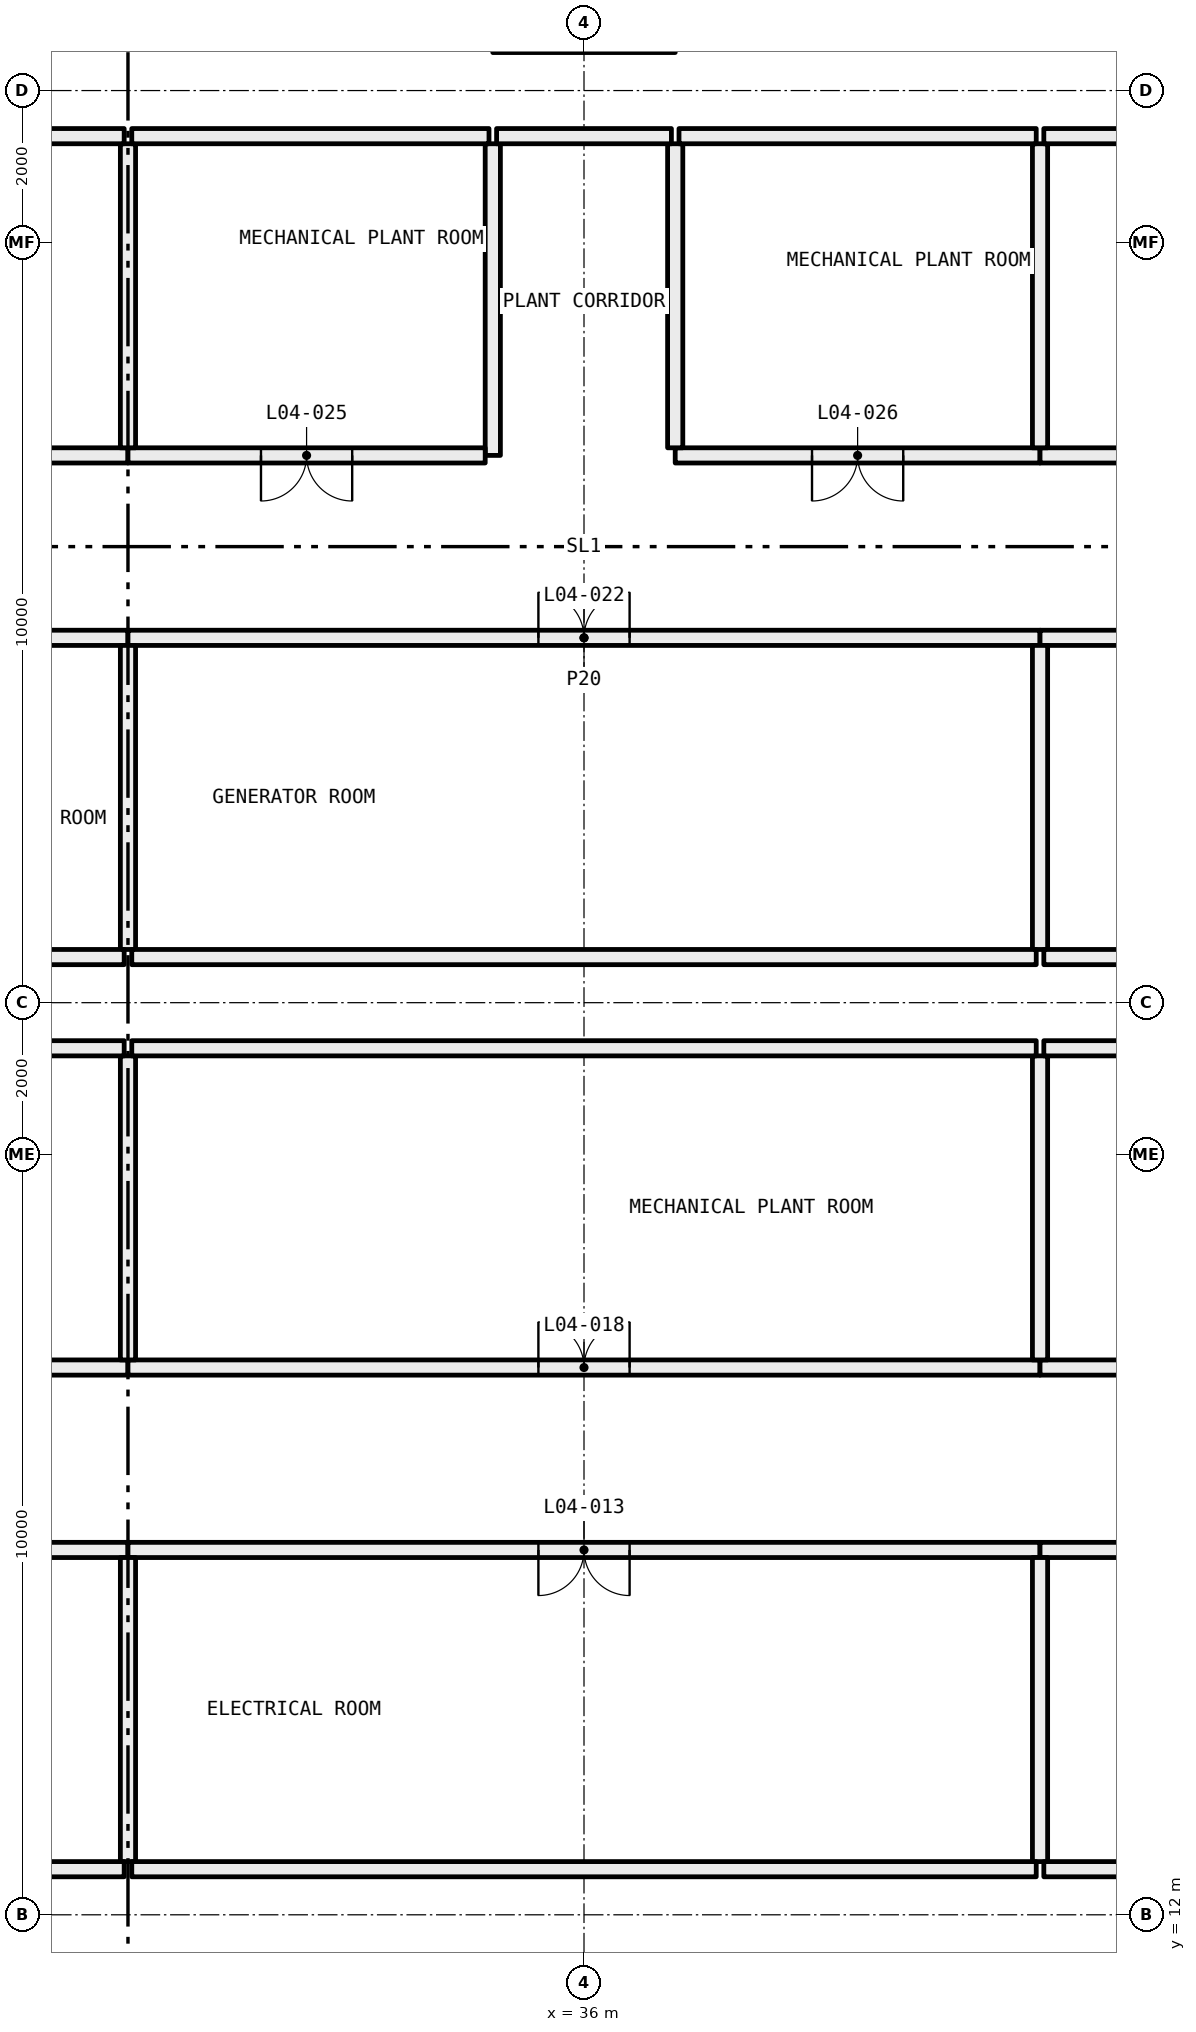
"""IFC4 building model, lengths in metres.
Left out: names, types, materials, properties, quantities, classifications, styles, units other than length and angle.
Written with IfcOpenShell. Run it as: python <this file> out.ifc"""

import sys

from ifc_helpers import new_model, si_unit, direction, frame, frame_2d, origin, place, context, subcontext, project, spatial, rectangle, extrude, element, fill, save


model = new_model("IFC4")
c1 = context("Model", 3, precision=1e-05, world=origin(), true_north=direction((0.0, 1.0)))
c2 = subcontext(c1, "Body", "Model", "MODEL_VIEW")
j1 = project(units=[si_unit("LENGTHUNIT", "METRE"), si_unit("PLANEANGLEUNIT", "RADIAN")], contexts=[c1])
p1 = place(None, origin())
s1 = spatial("IfcSite", under=j1, at=p1, CompositionType="ELEMENT")
p2 = place(p1, origin())
s2 = spatial("IfcBuilding", under=s1, at=p2, CompositionType="ELEMENT")
p3 = place(p2, frame((0.0, 0.0, 24.0)))
s3 = spatial("IfcBuildingStorey", under=s2, at=p3, CompositionType="ELEMENT", Elevation=24.0)
p4 = place(p3, frame((30.0, 16.8, 0.0), z_axis=(0.0, 0.0, 1.0), x_axis=(-1.0, 0.0, 0.0)))
e1 = element("IfcWall", 1, at=p4, inside=s3, PredefinedType="PARTITIONING", context=c2, shape_type="SweptSolid", body=[
    extrude(rectangle(XDim=12.0, YDim=0.2, at=frame_2d((6.0, 0.0))), origin(), (0.0, 0.0, 1.0), 5.6),
])
p5 = place(p4, frame((5.4, 0.0, 0.0)))
e2 = element("IfcOpeningElement", 2, at=p5, cuts=e1, PredefinedType="OPENING", context=c2, shape_type="SweptSolid", body=[
    extrude(rectangle(XDim=1.2, YDim=2.1, at=frame_2d((0.6, 1.05))), frame((0.0, 0.11, 0.0), z_axis=(0.0, -1.0, 0.0), x_axis=(1.0, 0.0, 0.0)), (0.0, 0.0, 1.0), 0.22),
])
p6 = place(p3, frame((42.0, 16.8, 0.0), z_axis=(0.0, 0.0, 1.0), x_axis=(-1.0, 0.0, 0.0)))
e3 = element("IfcWall", 3, at=p6, inside=s3, PredefinedType="PARTITIONING", context=c2, shape_type="SweptSolid", body=[
    extrude(rectangle(XDim=12.0, YDim=0.2, at=frame_2d((6.0, 0.0))), origin(), (0.0, 0.0, 1.0), 5.6),
])
p7 = place(p6, frame((5.4, 0.0, 0.0)))
e4 = element("IfcOpeningElement", 4, at=p7, cuts=e3, PredefinedType="OPENING", context=c2, shape_type="SweptSolid", body=[
    extrude(rectangle(XDim=1.2, YDim=2.1, at=frame_2d((0.6, 1.05))), frame((0.0, 0.11, 0.0), z_axis=(0.0, -1.0, 0.0), x_axis=(1.0, 0.0, 0.0)), (0.0, 0.0, 1.0), 0.22),
])
p8 = place(p3, frame((54.0, 16.8, 0.0), z_axis=(0.0, 0.0, 1.0), x_axis=(-1.0, 0.0, 0.0)))
e5 = element("IfcWall", 5, at=p8, inside=s3, PredefinedType="PARTITIONING", context=c2, shape_type="SweptSolid", body=[
    extrude(rectangle(XDim=12.0, YDim=0.2, at=frame_2d((6.0, 0.0))), origin(), (0.0, 0.0, 1.0), 5.6),
])
p9 = place(p8, frame((5.4, 0.0, 0.0)))
e6 = element("IfcOpeningElement", 6, at=p9, cuts=e5, PredefinedType="OPENING", context=c2, shape_type="SweptSolid", body=[
    extrude(rectangle(XDim=1.2, YDim=2.1, at=frame_2d((0.6, 1.05))), frame((0.0, 0.11, 0.0), z_axis=(0.0, -1.0, 0.0), x_axis=(1.0, 0.0, 0.0)), (0.0, 0.0, 1.0), 0.22),
])
p10 = place(p3, frame((18.0, 19.2, 0.0), z_axis=(0.0, 0.0, 1.0), x_axis=(1.0, 0.0, 0.0)))
e7 = element("IfcWall", 7, at=p10, inside=s3, PredefinedType="PARTITIONING", context=c2, shape_type="SweptSolid", body=[
    extrude(rectangle(XDim=12.0, YDim=0.2, at=frame_2d((6.0, 0.0))), origin(), (0.0, 0.0, 1.0), 5.6),
])
p11 = place(p10, frame((5.4, 0.0, 0.0)))
e8 = element("IfcOpeningElement", 8, at=p11, cuts=e7, PredefinedType="OPENING", context=c2, shape_type="SweptSolid", body=[
    extrude(rectangle(XDim=1.2, YDim=2.1, at=frame_2d((0.6, 1.05))), frame((0.0, 0.11, 0.0), z_axis=(0.0, -1.0, 0.0), x_axis=(1.0, 0.0, 0.0)), (0.0, 0.0, 1.0), 0.22),
])
p12 = place(p3, frame((30.0, 19.2, 0.0), z_axis=(0.0, 0.0, 1.0), x_axis=(1.0, 0.0, 0.0)))
e9 = element("IfcWall", 9, at=p12, inside=s3, PredefinedType="PARTITIONING", context=c2, shape_type="SweptSolid", body=[
    extrude(rectangle(XDim=12.0, YDim=0.2, at=frame_2d((6.0, 0.0))), origin(), (0.0, 0.0, 1.0), 5.6),
])
p13 = place(p12, frame((5.4, 0.0, 0.0)))
e10 = element("IfcOpeningElement", 10, at=p13, cuts=e9, PredefinedType="OPENING", context=c2, shape_type="SweptSolid", body=[
    extrude(rectangle(XDim=1.2, YDim=2.1, at=frame_2d((0.6, 1.05))), frame((0.0, 0.11, 0.0), z_axis=(0.0, -1.0, 0.0), x_axis=(1.0, 0.0, 0.0)), (0.0, 0.0, 1.0), 0.22),
])
p14 = place(p3, frame((42.0, 19.2, 0.0), z_axis=(0.0, 0.0, 1.0), x_axis=(1.0, 0.0, 0.0)))
e11 = element("IfcWall", 11, at=p14, inside=s3, PredefinedType="PARTITIONING", context=c2, shape_type="SweptSolid", body=[
    extrude(rectangle(XDim=12.0, YDim=0.2, at=frame_2d((6.0, 0.0))), origin(), (0.0, 0.0, 1.0), 5.6),
])
p15 = place(p14, frame((5.4, 0.0, 0.0)))
e12 = element("IfcOpeningElement", 12, at=p15, cuts=e11, PredefinedType="OPENING", context=c2, shape_type="SweptSolid", body=[
    extrude(rectangle(XDim=1.2, YDim=2.1, at=frame_2d((0.6, 1.05))), frame((0.0, 0.11, 0.0), z_axis=(0.0, -1.0, 0.0), x_axis=(1.0, 0.0, 0.0)), (0.0, 0.0, 1.0), 0.22),
])
p16 = place(p3, frame((23.5, 28.8, 0.0), z_axis=(0.0, 0.0, 1.0), x_axis=(1.0, 0.0, 0.0)))
e13 = element("IfcWall", 13, at=p16, inside=s3, PredefinedType="PARTITIONING", context=c2, shape_type="SweptSolid", body=[
    extrude(rectangle(XDim=6.5, YDim=0.2, at=frame_2d((3.25, 0.0))), origin(), (0.0, 0.0, 1.0), 5.6),
])
p17 = place(p16, frame((2.65, 0.0, 0.0)))
e14 = element("IfcOpeningElement", 14, at=p17, cuts=e13, PredefinedType="OPENING", context=c2, shape_type="SweptSolid", body=[
    extrude(rectangle(XDim=1.2, YDim=2.1, at=frame_2d((0.6, 1.05))), frame((0.0, 0.11, 0.0), z_axis=(0.0, -1.0, 0.0), x_axis=(1.0, 0.0, 0.0)), (0.0, 0.0, 1.0), 0.22),
])
p18 = place(p3, frame((30.0, 28.8, 0.0), z_axis=(0.0, 0.0, 1.0), x_axis=(1.0, 0.0, 0.0)))
e15 = element("IfcWall", 15, at=p18, inside=s3, PredefinedType="PARTITIONING", context=c2, shape_type="SweptSolid", body=[
    extrude(rectangle(XDim=12.0, YDim=0.2, at=frame_2d((6.0, 0.0))), origin(), (0.0, 0.0, 1.0), 5.6),
])
p19 = place(p18, frame((5.4, 0.0, 0.0)))
e16 = element("IfcOpeningElement", 16, at=p19, cuts=e15, PredefinedType="OPENING", context=c2, shape_type="SweptSolid", body=[
    extrude(rectangle(XDim=1.2, YDim=2.1, at=frame_2d((0.6, 1.05))), frame((0.0, 0.11, 0.0), z_axis=(0.0, -1.0, 0.0), x_axis=(1.0, 0.0, 0.0)), (0.0, 0.0, 1.0), 0.22),
])
p20 = place(p3, frame((42.0, 28.8, 0.0), z_axis=(0.0, 0.0, 1.0), x_axis=(1.0, 0.0, 0.0)))
e17 = element("IfcWall", 17, at=p20, inside=s3, PredefinedType="PARTITIONING", context=c2, shape_type="SweptSolid", body=[
    extrude(rectangle(XDim=6.5, YDim=0.2, at=frame_2d((3.25, 0.0))), origin(), (0.0, 0.0, 1.0), 5.6),
])
p21 = place(p20, frame((2.65, 0.0, 0.0)))
e18 = element("IfcOpeningElement", 18, at=p21, cuts=e17, PredefinedType="OPENING", context=c2, shape_type="SweptSolid", body=[
    extrude(rectangle(XDim=1.2, YDim=2.1, at=frame_2d((0.6, 1.05))), frame((0.0, 0.11, 0.0), z_axis=(0.0, -1.0, 0.0), x_axis=(1.0, 0.0, 0.0)), (0.0, 0.0, 1.0), 0.22),
])
p22 = place(p3, frame((30.0, 31.2, 0.0), z_axis=(0.0, 0.0, 1.0), x_axis=(-1.0, 0.0, 0.0)))
e19 = element("IfcWall", 19, at=p22, inside=s3, PredefinedType="PARTITIONING", context=c2, shape_type="SweptSolid", body=[
    extrude(rectangle(XDim=6.5, YDim=0.2, at=frame_2d((3.25, 0.0))), origin(), (0.0, 0.0, 1.0), 5.6),
])
p23 = place(p22, frame((2.65, 0.0, 0.0)))
e20 = element("IfcOpeningElement", 20, at=p23, cuts=e19, PredefinedType="OPENING", context=c2, shape_type="SweptSolid", body=[
    extrude(rectangle(XDim=1.2, YDim=2.1, at=frame_2d((0.6, 1.05))), frame((0.0, 0.11, 0.0), z_axis=(0.0, -1.0, 0.0), x_axis=(1.0, 0.0, 0.0)), (0.0, 0.0, 1.0), 0.22),
])
p24 = place(p3, frame((34.8, 35.3, 0.0), z_axis=(0.0, 0.0, 1.0), x_axis=(0.0, -1.0, 0.0)))
e21 = element("IfcWall", 21, at=p24, inside=s3, PredefinedType="PARTITIONING", context=c2, shape_type="SweptSolid", body=[
    extrude(rectangle(XDim=4.1, YDim=0.2, at=frame_2d((2.05, 0.0))), origin(), (0.0, 0.0, 1.0), 5.6),
])
p25 = place(p3, frame((34.7, 31.2, 0.0), z_axis=(0.0, 0.0, 1.0), x_axis=(-1.0, 0.0, 0.0)))
e22 = element("IfcWall", 22, at=p25, inside=s3, PredefinedType="PARTITIONING", context=c2, shape_type="SweptSolid", body=[
    extrude(rectangle(XDim=4.7, YDim=0.2, at=frame_2d((2.35, 0.0))), origin(), (0.0, 0.0, 1.0), 5.6),
])
p26 = place(p25, frame((1.75, 0.0, 0.0)))
e23 = element("IfcOpeningElement", 23, at=p26, cuts=e22, PredefinedType="OPENING", context=c2, shape_type="SweptSolid", body=[
    extrude(rectangle(XDim=1.2, YDim=2.1, at=frame_2d((0.6, 1.05))), frame((0.0, 0.11, 0.0), z_axis=(0.0, -1.0, 0.0), x_axis=(1.0, 0.0, 0.0)), (0.0, 0.0, 1.0), 0.22),
])
p27 = place(p3, frame((42.0, 31.2, 0.0), z_axis=(0.0, 0.0, 1.0), x_axis=(-1.0, 0.0, 0.0)))
e24 = element("IfcWall", 24, at=p27, inside=s3, PredefinedType="PARTITIONING", context=c2, shape_type="SweptSolid", body=[
    extrude(rectangle(XDim=4.8, YDim=0.2, at=frame_2d((2.4, 0.0))), origin(), (0.0, 0.0, 1.0), 5.6),
])
p28 = place(p27, frame((1.8, 0.0, 0.0)))
e25 = element("IfcOpeningElement", 25, at=p28, cuts=e24, PredefinedType="OPENING", context=c2, shape_type="SweptSolid", body=[
    extrude(rectangle(XDim=1.2, YDim=2.1, at=frame_2d((0.6, 1.05))), frame((0.0, 0.11, 0.0), z_axis=(0.0, -1.0, 0.0), x_axis=(1.0, 0.0, 0.0)), (0.0, 0.0, 1.0), 0.22),
])
p29 = place(p3, frame((37.2, 31.3, 0.0), z_axis=(0.0, 0.0, 1.0), x_axis=(0.0, 1.0, 0.0)))
e26 = element("IfcWall", 26, at=p29, inside=s3, PredefinedType="PARTITIONING", context=c2, shape_type="SweptSolid", body=[
    extrude(rectangle(XDim=4.0, YDim=0.2, at=frame_2d((2.0, 0.0))), origin(), (0.0, 0.0, 1.0), 5.6),
])
p30 = place(p3, frame((48.5, 31.2, 0.0), z_axis=(0.0, 0.0, 1.0), x_axis=(-1.0, 0.0, 0.0)))
e27 = element("IfcWall", 27, at=p30, inside=s3, PredefinedType="PARTITIONING", context=c2, shape_type="SweptSolid", body=[
    extrude(rectangle(XDim=6.5, YDim=0.2, at=frame_2d((3.25, 0.0))), origin(), (0.0, 0.0, 1.0), 5.6),
])
p31 = place(p30, frame((2.65, 0.0, 0.0)))
e28 = element("IfcOpeningElement", 28, at=p31, cuts=e27, PredefinedType="OPENING", context=c2, shape_type="SweptSolid", body=[
    extrude(rectangle(XDim=1.2, YDim=2.1, at=frame_2d((0.6, 1.05))), frame((0.0, 0.11, 0.0), z_axis=(0.0, -1.0, 0.0), x_axis=(1.0, 0.0, 0.0)), (0.0, 0.0, 1.0), 0.22),
])
for number, where, z_axis, x_axis in (
    (29, (30.0, 12.7, 0.0), (0.0, 0.0, 1.0), (0.0, 1.0, 0.0)),
    (30, (42.0, 12.7, 0.0), (0.0, 0.0, 1.0), (0.0, 1.0, 0.0)),
    (31, (30.0, 19.3, 0.0), (0.0, 0.0, 1.0), (0.0, 1.0, 0.0)),
    (32, (42.0, 19.3, 0.0), (0.0, 0.0, 1.0), (0.0, 1.0, 0.0)),
    (33, (30.0, 24.7, 0.0), (0.0, 0.0, 1.0), (0.0, 1.0, 0.0)),
    (34, (42.0, 24.7, 0.0), (0.0, 0.0, 1.0), (0.0, 1.0, 0.0)),
    (35, (30.0, 31.3, 0.0), (0.0, 0.0, 1.0), (0.0, 1.0, 0.0)),
    (36, (42.0, 31.3, 0.0), (0.0, 0.0, 1.0), (0.0, 1.0, 0.0)),
):
    element("IfcWall", number, at=place(p3, frame(where, z_axis=z_axis, x_axis=x_axis)), inside=s3, PredefinedType="PARTITIONING", context=c2, shape_type="SweptSolid", body=[
        extrude(rectangle(XDim=4.0, YDim=0.2, at=frame_2d((2.0, 0.0))), origin(), (0.0, 0.0, 1.0), 5.6),
    ])
p32 = place(p3, frame((37.15, 35.4, 0.0), z_axis=(0.0, 0.0, 1.0), x_axis=(-1.0, 0.0, 0.0)))
e37 = element("IfcWall", 37, at=p32, inside=s3, PredefinedType="PARTITIONING", context=c2, shape_type="SweptSolid", body=[
    extrude(rectangle(XDim=2.3, YDim=0.2, at=frame_2d((1.15, 0.0))), origin(), (0.0, 0.0, 1.0), 5.6),
])
p33 = place(p3, frame((24.55, 12.6, 0.0), z_axis=(0.0, 0.0, 1.0), x_axis=(1.0, 0.0, 0.0)))
e38 = element("IfcWall", 38, at=p33, inside=s3, PredefinedType="PARTITIONING", context=c2, shape_type="SweptSolid", body=[
    extrude(rectangle(XDim=5.4, YDim=0.2, at=frame_2d((2.7, 0.0))), origin(), (0.0, 0.0, 1.0), 5.6),
])
p34 = place(p3, frame((30.05, 12.6, 0.0), z_axis=(0.0, 0.0, 1.0), x_axis=(1.0, 0.0, 0.0)))
e39 = element("IfcWall", 39, at=p34, inside=s3, PredefinedType="PARTITIONING", context=c2, shape_type="SweptSolid", body=[
    extrude(rectangle(XDim=11.9, YDim=0.2, at=frame_2d((5.95, 0.0))), origin(), (0.0, 0.0, 1.0), 5.6),
])
p35 = place(p3, frame((42.05, 12.6, 0.0), z_axis=(0.0, 0.0, 1.0), x_axis=(1.0, 0.0, 0.0)))
e40 = element("IfcWall", 40, at=p35, inside=s3, PredefinedType="PARTITIONING", context=c2, shape_type="SweptSolid", body=[
    extrude(rectangle(XDim=5.2, YDim=0.2, at=frame_2d((2.6, 0.0))), origin(), (0.0, 0.0, 1.0), 5.6),
])
p36 = place(p3, frame((29.95, 23.4, 0.0), z_axis=(0.0, 0.0, 1.0), x_axis=(-1.0, 0.0, 0.0)))
e41 = element("IfcWall", 41, at=p36, inside=s3, PredefinedType="PARTITIONING", context=c2, shape_type="SweptSolid", body=[
    extrude(rectangle(XDim=6.0, YDim=0.2, at=frame_2d((3.0, 0.0))), origin(), (0.0, 0.0, 1.0), 5.6),
])
p37 = place(p3, frame((41.95, 23.4, 0.0), z_axis=(0.0, 0.0, 1.0), x_axis=(-1.0, 0.0, 0.0)))
e42 = element("IfcWall", 42, at=p37, inside=s3, PredefinedType="PARTITIONING", context=c2, shape_type="SweptSolid", body=[
    extrude(rectangle(XDim=11.9, YDim=0.2, at=frame_2d((5.95, 0.0))), origin(), (0.0, 0.0, 1.0), 5.6),
])
for number, where, z_axis, x_axis in (
    (43, (48.05, 23.4, 0.0), (0.0, 0.0, 1.0), (-1.0, 0.0, 0.0)),
    (44, (23.95, 24.6, 0.0), (0.0, 0.0, 1.0), (1.0, 0.0, 0.0)),
):
    element("IfcWall", number, at=place(p3, frame(where, z_axis=z_axis, x_axis=x_axis)), inside=s3, PredefinedType="PARTITIONING", context=c2, shape_type="SweptSolid", body=[
        extrude(rectangle(XDim=6.0, YDim=0.2, at=frame_2d((3.0, 0.0))), origin(), (0.0, 0.0, 1.0), 5.6),
    ])
p38 = place(p3, frame((30.05, 24.6, 0.0), z_axis=(0.0, 0.0, 1.0), x_axis=(1.0, 0.0, 0.0)))
e45 = element("IfcWall", 45, at=p38, inside=s3, PredefinedType="PARTITIONING", context=c2, shape_type="SweptSolid", body=[
    extrude(rectangle(XDim=11.9, YDim=0.2, at=frame_2d((5.95, 0.0))), origin(), (0.0, 0.0, 1.0), 5.6),
])
for number, where, z_axis, x_axis in (
    (46, (42.05, 24.6, 0.0), (0.0, 0.0, 1.0), (1.0, 0.0, 0.0)),
    (47, (29.95, 35.4, 0.0), (0.0, 0.0, 1.0), (-1.0, 0.0, 0.0)),
):
    element("IfcWall", number, at=place(p3, frame(where, z_axis=z_axis, x_axis=x_axis)), inside=s3, PredefinedType="PARTITIONING", context=c2, shape_type="SweptSolid", body=[
        extrude(rectangle(XDim=6.0, YDim=0.2, at=frame_2d((3.0, 0.0))), origin(), (0.0, 0.0, 1.0), 5.6),
    ])
for number, where, z_axis, x_axis in (
    (48, (34.75, 35.4, 0.0), (0.0, 0.0, 1.0), (-1.0, 0.0, 0.0)),
    (49, (41.95, 35.4, 0.0), (0.0, 0.0, 1.0), (-1.0, 0.0, 0.0)),
):
    element("IfcWall", number, at=place(p3, frame(where, z_axis=z_axis, x_axis=x_axis)), inside=s3, PredefinedType="PARTITIONING", context=c2, shape_type="SweptSolid", body=[
        extrude(rectangle(XDim=4.7, YDim=0.2, at=frame_2d((2.35, 0.0))), origin(), (0.0, 0.0, 1.0), 5.6),
    ])
p39 = place(p3, frame((48.05, 35.4, 0.0), z_axis=(0.0, 0.0, 1.0), x_axis=(-1.0, 0.0, 0.0)))
e50 = element("IfcWall", 50, at=p39, inside=s3, PredefinedType="PARTITIONING", context=c2, shape_type="SweptSolid", body=[
    extrude(rectangle(XDim=6.0, YDim=0.2, at=frame_2d((3.0, 0.0))), origin(), (0.0, 0.0, 1.0), 5.6),
])
p40 = place(p7, origin())
e51 = element("IfcDoor", 51, at=p40, inside=s3, OperationType="DOUBLE_DOOR_SINGLE_SWING", PredefinedType="DOOR", context=c2, shape_type="SweptSolid", body=[
    extrude(rectangle(XDim=1.2, YDim=2.1, at=frame_2d((0.6, 1.05))), frame((0.0, 0.025, 0.0), z_axis=(0.0, -1.0, 0.0), x_axis=(1.0, 0.0, 0.0)), (0.0, 0.0, 1.0), 0.05),
])
fill(e4, e51)
p41 = place(p13, origin())
e52 = element("IfcDoor", 52, at=p41, inside=s3, OperationType="DOUBLE_DOOR_SINGLE_SWING", PredefinedType="DOOR", context=c2, shape_type="SweptSolid", body=[
    extrude(rectangle(XDim=1.2, YDim=2.1, at=frame_2d((0.6, 1.05))), frame((0.0, 0.025, 0.0), z_axis=(0.0, -1.0, 0.0), x_axis=(1.0, 0.0, 0.0)), (0.0, 0.0, 1.0), 0.05),
])
fill(e10, e52)
p42 = place(p19, origin())
e53 = element("IfcDoor", 53, at=p42, inside=s3, OperationType="DOUBLE_DOOR_SINGLE_SWING", PredefinedType="DOOR", context=c2, shape_type="SweptSolid", body=[
    extrude(rectangle(XDim=1.2, YDim=2.1, at=frame_2d((0.6, 1.05))), frame((0.0, 0.025, 0.0), z_axis=(0.0, -1.0, 0.0), x_axis=(1.0, 0.0, 0.0)), (0.0, 0.0, 1.0), 0.05),
])
fill(e16, e53)
p43 = place(p26, origin())
e54 = element("IfcDoor", 54, at=p43, inside=s3, OperationType="DOUBLE_DOOR_SINGLE_SWING", PredefinedType="DOOR", context=c2, shape_type="SweptSolid", body=[
    extrude(rectangle(XDim=1.2, YDim=2.1, at=frame_2d((0.6, 1.05))), frame((0.0, 0.025, 0.0), z_axis=(0.0, -1.0, 0.0), x_axis=(1.0, 0.0, 0.0)), (0.0, 0.0, 1.0), 0.05),
])
fill(e23, e54)
p44 = place(p28, origin())
e55 = element("IfcDoor", 55, at=p44, inside=s3, OperationType="DOUBLE_DOOR_SINGLE_SWING", PredefinedType="DOOR", context=c2, shape_type="SweptSolid", body=[
    extrude(rectangle(XDim=1.2, YDim=2.1, at=frame_2d((0.6, 1.05))), frame((0.0, 0.025, 0.0), z_axis=(0.0, -1.0, 0.0), x_axis=(1.0, 0.0, 0.0)), (0.0, 0.0, 1.0), 0.05),
])
fill(e25, e55)
save(model, sys.argv[1])
